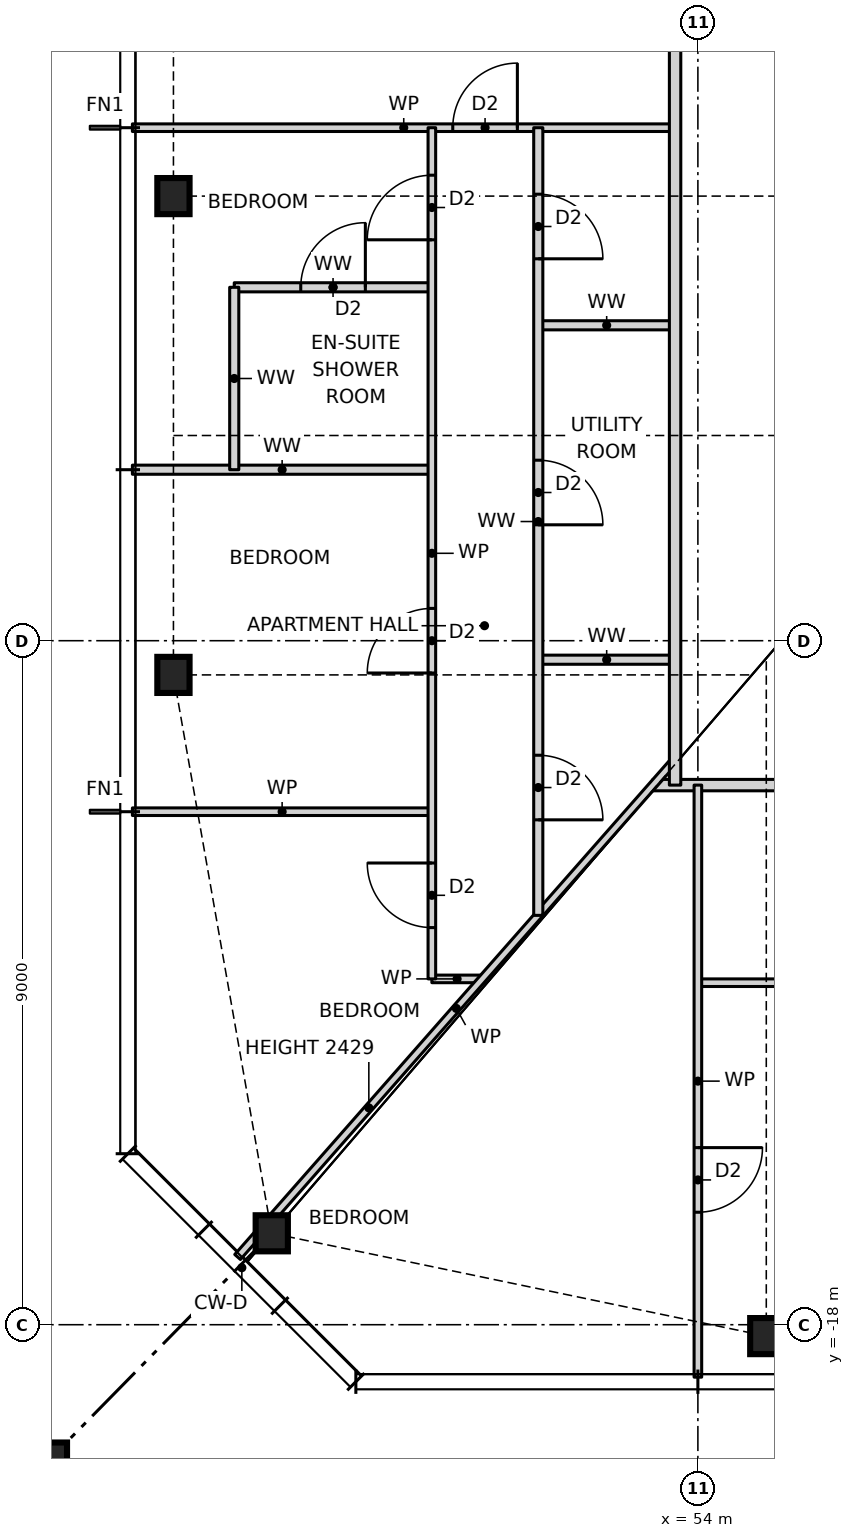
"""IFC4 building model, lengths in metres.
Left out: names, types, materials, properties, quantities, classifications, styles, units other than length and angle.
Written with IfcOpenShell. Run it as: python <this file> out.ifc"""

import sys

from ifc_helpers import new_model, si_unit, direction, frame, frame_2d, origin, origin_2d, place, context, subcontext, project, spatial, rectangle, hollow_rectangle, i_section, extrude, element, fill, save


model = new_model("IFC4")
c1 = context("Model", 3, precision=1e-05, world=origin(), true_north=direction((0.0, 1.0)))
c2 = subcontext(c1, "Body", "Model", "MODEL_VIEW")
j1 = project(units=[si_unit("LENGTHUNIT", "METRE"), si_unit("PLANEANGLEUNIT", "RADIAN")], contexts=[c1])
p1 = place(None, origin())
s1 = spatial("IfcSite", under=j1, at=p1, CompositionType="ELEMENT")
p2 = place(p1, origin())
s2 = spatial("IfcBuilding", under=s1, at=p2, CompositionType="ELEMENT")
p3 = place(p2, frame((0.0, 0.0, 57.0)))
s3 = spatial("IfcBuildingStorey", under=s2, at=p3, CompositionType="ELEMENT", Elevation=57.0)
for number, where, z_axis, x_axis in (
    (1, (48.394, -16.797, 0.0), (0.0, 0.0, 1.0), (1.0, 0.0, 0.0)),
    (2, (54.9, -18.15, 0.0), (0.0, 0.0, 1.0), (1.0, 0.0, 0.0)),
    (3, (47.1, -3.15, 0.0), (0.0, 0.0, 1.0), (1.0, 0.0, 0.0)),
    (4, (47.1, -9.45, 0.0), (0.0, 0.0, 1.0), (1.0, 0.0, 0.0)),
):
    element("IfcColumn", number, at=place(p3, frame(where, z_axis=z_axis, x_axis=x_axis)), inside=s3, PredefinedType="COLUMN", context=c2, shape_type="SweptSolid", body=[
        extrude(i_section(OverallWidth=0.424, OverallDepth=0.475, WebThickness=0.048, FlangeThickness=0.077, at=origin_2d()), origin(), (0.0, 0.0, 1.0), 3.5),
    ])
p4 = place(p3, frame((45.1, -20.15, 0.0), z_axis=(0.0, 0.0, 1.0), x_axis=(1.0, 0.0, 0.0)))
e5 = element("IfcColumn", 5, at=p4, inside=s3, PredefinedType="COLUMN", context=c2, shape_type="SweptSolid", body=[
    extrude(hollow_rectangle(XDim=1.2, YDim=1.2, WallThickness=0.07, at=origin_2d()), origin(), (0.0, 0.0, 1.0), 3.5),
])
p5 = place(p3, frame((54.0, -13.5, 0.0), z_axis=(0.0, 0.0, 1.0), x_axis=(1.0, 0.0, 0.0)))
e6 = element("IfcWall", 6, at=p5, inside=s3, PredefinedType="PARTITIONING", context=c2, shape_type="SweptSolid", body=[
    extrude(rectangle(XDim=9.0, YDim=0.1, at=frame_2d((4.5, 0.0))), origin(), (0.0, 0.0, 1.0), 3.27),
])
p6 = place(p5, frame((1.375, 0.0, 0.0)))
e7 = element("IfcOpeningElement", 7, at=p6, cuts=e6, PredefinedType="OPENING", context=c2, shape_type="SweptSolid", body=[
    extrude(rectangle(XDim=0.85, YDim=2.1, at=frame_2d((0.425, 1.05))), frame((0.0, 0.06, 0.0), z_axis=(0.0, -1.0, 0.0), x_axis=(1.0, 0.0, 0.0)), (0.0, 0.0, 1.0), 0.12),
])
p7 = place(p5, frame((4.575, 0.0, 0.0)))
e8 = element("IfcOpeningElement", 8, at=p7, cuts=e6, PredefinedType="OPENING", context=c2, shape_type="SweptSolid", body=[
    extrude(rectangle(XDim=0.85, YDim=2.1, at=frame_2d((0.425, 1.05))), frame((0.0, 0.06, 0.0), z_axis=(0.0, -1.0, 0.0), x_axis=(1.0, 0.0, 0.0)), (0.0, 0.0, 1.0), 0.12),
])
p8 = place(p3, frame((50.5, -13.45, 0.0), z_axis=(0.0, 0.0, 1.0), x_axis=(1.0, 0.0, 0.0)))
e9 = element("IfcWall", 9, at=p8, inside=s3, PredefinedType="PARTITIONING", context=c2, shape_type="SweptSolid", body=[
    extrude(rectangle(XDim=0.664, YDim=0.1, at=frame_2d((0.332, 0.0))), origin(), (0.0, 0.0, 1.0), 3.27),
])
p9 = place(p3, frame((46.56, -11.25, 0.0), z_axis=(0.0, 0.0, 1.0), x_axis=(1.0, 0.0, 0.0)))
e10 = element("IfcWall", 10, at=p9, inside=s3, PredefinedType="PARTITIONING", context=c2, shape_type="SweptSolid", body=[
    extrude(rectangle(XDim=3.94, YDim=0.1, at=frame_2d((1.97, 0.0))), origin(), (0.0, 0.0, 1.0), 3.27),
])
p10 = place(p3, frame((53.408, -10.9, 0.0), z_axis=(0.0, 0.0, 1.0), x_axis=(1.0, 0.0, 0.0)))
e11 = element("IfcWall", 11, at=p10, inside=s3, PredefinedType="PARTITIONING", context=c2, shape_type="SweptSolid", body=[
    extrude(rectangle(XDim=19.184, YDim=0.15, at=frame_2d((9.592, 0.0))), origin(), (0.0, 0.0, 1.0), 3.27),
])
p11 = place(p10, frame((5.092, 0.0, 0.0)))
e12 = element("IfcOpeningElement", 12, at=p11, cuts=e11, PredefinedType="OPENING", context=c2, shape_type="SweptSolid", body=[
    extrude(rectangle(XDim=1.0, YDim=2.1, at=frame_2d((0.5, 1.05))), frame((0.0, 0.085, 0.0), z_axis=(0.0, -1.0, 0.0), x_axis=(1.0, 0.0, 0.0)), (0.0, 0.0, 1.0), 0.17),
])
p12 = place(p10, frame((10.492, 0.0, 0.0)))
e13 = element("IfcOpeningElement", 13, at=p12, cuts=e11, PredefinedType="OPENING", context=c2, shape_type="SweptSolid", body=[
    extrude(rectangle(XDim=1.0, YDim=2.1, at=frame_2d((0.5, 1.05))), frame((0.0, 0.085, 0.0), z_axis=(0.0, -1.0, 0.0), x_axis=(1.0, 0.0, 0.0)), (0.0, 0.0, 1.0), 0.17),
])
p13 = place(p3, frame((51.9, -9.25, 0.0), z_axis=(0.0, 0.0, 1.0), x_axis=(1.0, 0.0, 0.0)))
e14 = element("IfcWall", 14, at=p13, inside=s3, PredefinedType="PARTITIONING", context=c2, shape_type="SweptSolid", body=[
    extrude(rectangle(XDim=1.8, YDim=0.12, at=frame_2d((0.9, 0.0))), origin(), (0.0, 0.0, 1.0), 3.27),
])
p14 = place(p3, frame((46.56, -6.75, 0.0), z_axis=(0.0, 0.0, 1.0), x_axis=(1.0, 0.0, 0.0)))
e15 = element("IfcWall", 15, at=p14, inside=s3, PredefinedType="PARTITIONING", context=c2, shape_type="SweptSolid", body=[
    extrude(rectangle(XDim=3.94, YDim=0.12, at=frame_2d((1.97, 0.0))), origin(), (0.0, 0.0, 1.0), 3.27),
])
p15 = place(p3, frame((51.9, -4.85, 0.0), z_axis=(0.0, 0.0, 1.0), x_axis=(1.0, 0.0, 0.0)))
e16 = element("IfcWall", 16, at=p15, inside=s3, PredefinedType="PARTITIONING", context=c2, shape_type="SweptSolid", body=[
    extrude(rectangle(XDim=1.8, YDim=0.12, at=frame_2d((0.9, 0.0))), origin(), (0.0, 0.0, 1.0), 3.27),
])
p16 = place(p3, frame((47.9, -4.35, 0.0), z_axis=(0.0, 0.0, 1.0), x_axis=(1.0, 0.0, 0.0)))
e17 = element("IfcWall", 17, at=p16, inside=s3, PredefinedType="PARTITIONING", context=c2, shape_type="SweptSolid", body=[
    extrude(rectangle(XDim=2.6, YDim=0.12, at=frame_2d((1.3, 0.0))), origin(), (0.0, 0.0, 1.0), 3.27),
])
p17 = place(p16, frame((0.875, 0.0, 0.0)))
e18 = element("IfcOpeningElement", 18, at=p17, cuts=e17, PredefinedType="OPENING", context=c2, shape_type="SweptSolid", body=[
    extrude(rectangle(XDim=0.85, YDim=2.1, at=frame_2d((0.425, 1.05))), frame((0.0, 0.07, 0.0), z_axis=(0.0, -1.0, 0.0), x_axis=(1.0, 0.0, 0.0)), (0.0, 0.0, 1.0), 0.14),
])
p18 = place(p3, frame((46.56, -2.25, 0.0), z_axis=(0.0, 0.0, 1.0), x_axis=(1.0, 0.0, 0.0)))
e19 = element("IfcWall", 19, at=p18, inside=s3, PredefinedType="PARTITIONING", context=c2, shape_type="SweptSolid", body=[
    extrude(rectangle(XDim=7.14, YDim=0.1, at=frame_2d((3.57, 0.0))), origin(), (0.0, 0.0, 1.0), 3.27),
])
p19 = place(p18, frame((4.215, 0.0, 0.0)))
e20 = element("IfcOpeningElement", 20, at=p19, cuts=e19, PredefinedType="OPENING", context=c2, shape_type="SweptSolid", body=[
    extrude(rectangle(XDim=0.85, YDim=2.1, at=frame_2d((0.425, 1.05))), frame((0.0, 0.06, 0.0), z_axis=(0.0, -1.0, 0.0), x_axis=(1.0, 0.0, 0.0)), (0.0, 0.0, 1.0), 0.12),
])
p20 = place(p3, frame((47.944, -17.109, 0.0), z_axis=(0.0, 0.0, 1.0), x_axis=(0.660612734851, 0.750726857487, 0.0)))
e21 = element("IfcWall", 21, at=p20, inside=s3, PredefinedType="PARTITIONING", context=c2, shape_type="SweptSolid", body=[
    extrude(rectangle(XDim=8.713, YDim=0.1, at=frame_2d((4.356, 0.0))), origin(), (0.0, 0.0, 1.0), 2.429),
])
p21 = place(p3, frame((54.0, -18.69, 0.0), z_axis=(0.0, 0.0, 1.0), x_axis=(0.0, 1.0, 0.0)))
e22 = element("IfcWall", 22, at=p21, inside=s3, PredefinedType="PARTITIONING", context=c2, shape_type="SweptSolid", body=[
    extrude(rectangle(XDim=7.79, YDim=0.1, at=frame_2d((3.895, 0.0))), origin(), (0.0, 0.0, 1.0), 3.27),
])
p22 = place(p21, frame((2.17, 0.0, 0.0)))
e23 = element("IfcOpeningElement", 23, at=p22, cuts=e22, PredefinedType="OPENING", context=c2, shape_type="SweptSolid", body=[
    extrude(rectangle(XDim=0.85, YDim=2.1, at=frame_2d((0.425, 1.05))), frame((0.0, 0.06, 0.0), z_axis=(0.0, -1.0, 0.0), x_axis=(1.0, 0.0, 0.0)), (0.0, 0.0, 1.0), 0.12),
])
p23 = place(p3, frame((53.7, -10.9, 0.0), z_axis=(0.0, 0.0, 1.0), x_axis=(0.0, 1.0, 0.0)))
e24 = element("IfcWall", 24, at=p23, inside=s3, PredefinedType="PARTITIONING", context=c2, shape_type="SweptSolid", body=[
    extrude(rectangle(XDim=21.468, YDim=0.15, at=frame_2d((10.734, 0.0))), origin(), (0.0, 0.0, 1.0), 3.27),
])
p24 = place(p23, frame((16.65, 0.0, 0.0)))
e25 = element("IfcOpeningElement", 25, at=p24, cuts=e24, PredefinedType="OPENING", context=c2, shape_type="SweptSolid", body=[
    extrude(rectangle(XDim=1.0, YDim=2.1, at=frame_2d((0.5, 1.05))), frame((0.0, 0.085, 0.0), z_axis=(0.0, -1.0, 0.0), x_axis=(1.0, 0.0, 0.0)), (0.0, 0.0, 1.0), 0.17),
])
p25 = place(p23, frame((11.25, 0.0, 0.0)))
e26 = element("IfcOpeningElement", 26, at=p25, cuts=e24, PredefinedType="OPENING", context=c2, shape_type="SweptSolid", body=[
    extrude(rectangle(XDim=1.0, YDim=2.1, at=frame_2d((0.5, 1.05))), frame((0.0, 0.085, 0.0), z_axis=(0.0, -1.0, 0.0), x_axis=(1.0, 0.0, 0.0)), (0.0, 0.0, 1.0), 0.17),
])
p26 = place(p3, frame((51.9, -12.614, 0.0), z_axis=(0.0, 0.0, 1.0), x_axis=(0.0, 1.0, 0.0)))
e27 = element("IfcWall", 27, at=p26, inside=s3, PredefinedType="PARTITIONING", context=c2, shape_type="SweptSolid", body=[
    extrude(rectangle(XDim=10.364, YDim=0.12, at=frame_2d((5.182, 0.0))), origin(), (0.0, 0.0, 1.0), 3.27),
])
p27 = place(p26, frame((8.639, 0.0, 0.0)))
e28 = element("IfcOpeningElement", 28, at=p27, cuts=e27, PredefinedType="OPENING", context=c2, shape_type="SweptSolid", body=[
    extrude(rectangle(XDim=0.85, YDim=2.1, at=frame_2d((0.425, 1.05))), frame((0.0, 0.07, 0.0), z_axis=(0.0, -1.0, 0.0), x_axis=(1.0, 0.0, 0.0)), (0.0, 0.0, 1.0), 0.14),
])
p28 = place(p26, frame((5.139, 0.0, 0.0)))
e29 = element("IfcOpeningElement", 29, at=p28, cuts=e27, PredefinedType="OPENING", context=c2, shape_type="SweptSolid", body=[
    extrude(rectangle(XDim=0.85, YDim=2.1, at=frame_2d((0.425, 1.05))), frame((0.0, 0.07, 0.0), z_axis=(0.0, -1.0, 0.0), x_axis=(1.0, 0.0, 0.0)), (0.0, 0.0, 1.0), 0.14),
])
p29 = place(p26, frame((1.257, 0.0, 0.0)))
e30 = element("IfcOpeningElement", 30, at=p29, cuts=e27, PredefinedType="OPENING", context=c2, shape_type="SweptSolid", body=[
    extrude(rectangle(XDim=0.85, YDim=2.1, at=frame_2d((0.425, 1.05))), frame((0.0, 0.07, 0.0), z_axis=(0.0, -1.0, 0.0), x_axis=(1.0, 0.0, 0.0)), (0.0, 0.0, 1.0), 0.14),
])
p30 = place(p3, frame((50.5, -13.45, 0.0), z_axis=(0.0, 0.0, 1.0), x_axis=(0.0, 1.0, 0.0)))
e31 = element("IfcWall", 31, at=p30, inside=s3, PredefinedType="PARTITIONING", context=c2, shape_type="SweptSolid", body=[
    extrude(rectangle(XDim=11.2, YDim=0.1, at=frame_2d((5.6, 0.0))), origin(), (0.0, 0.0, 1.0), 3.27),
])
p31 = place(p30, frame((9.725, 0.0, 0.0)))
e32 = element("IfcOpeningElement", 32, at=p31, cuts=e31, PredefinedType="OPENING", context=c2, shape_type="SweptSolid", body=[
    extrude(rectangle(XDim=0.85, YDim=2.1, at=frame_2d((0.425, 1.05))), frame((0.0, 0.06, 0.0), z_axis=(0.0, -1.0, 0.0), x_axis=(1.0, 0.0, 0.0)), (0.0, 0.0, 1.0), 0.12),
])
p32 = place(p30, frame((4.025, 0.0, 0.0)))
e33 = element("IfcOpeningElement", 33, at=p32, cuts=e31, PredefinedType="OPENING", context=c2, shape_type="SweptSolid", body=[
    extrude(rectangle(XDim=0.85, YDim=2.1, at=frame_2d((0.425, 1.05))), frame((0.0, 0.06, 0.0), z_axis=(0.0, -1.0, 0.0), x_axis=(1.0, 0.0, 0.0)), (0.0, 0.0, 1.0), 0.12),
])
p33 = place(p30, frame((0.675, 0.0, 0.0)))
e34 = element("IfcOpeningElement", 34, at=p33, cuts=e31, PredefinedType="OPENING", context=c2, shape_type="SweptSolid", body=[
    extrude(rectangle(XDim=0.85, YDim=2.1, at=frame_2d((0.425, 1.05))), frame((0.0, 0.06, 0.0), z_axis=(0.0, -1.0, 0.0), x_axis=(1.0, 0.0, 0.0)), (0.0, 0.0, 1.0), 0.12),
])
p34 = place(p3, frame((47.9, -6.75, 0.0), z_axis=(0.0, 0.0, 1.0), x_axis=(0.0, 1.0, 0.0)))
e35 = element("IfcWall", 35, at=p34, inside=s3, PredefinedType="PARTITIONING", context=c2, shape_type="SweptSolid", body=[
    extrude(rectangle(XDim=2.4, YDim=0.12, at=frame_2d((1.2, 0.0))), origin(), (0.0, 0.0, 1.0), 3.27),
])
p35 = place(p22, frame((0.85, 0.0, 0.0), z_axis=(0.0, 0.0, 1.0), x_axis=(-1.0, 0.0, 0.0)))
e36 = element("IfcDoor", 36, at=p35, inside=s3, OperationType="SINGLE_SWING_LEFT", PredefinedType="DOOR", context=c2, shape_type="SweptSolid", body=[
    extrude(rectangle(XDim=0.85, YDim=2.1, at=frame_2d((0.425, 1.05))), frame((0.0, 0.025, 0.0), z_axis=(0.0, -1.0, 0.0), x_axis=(1.0, 0.0, 0.0)), (0.0, 0.0, 1.0), 0.05),
])
fill(e23, e36)
p36 = place(p19, origin())
e37 = element("IfcDoor", 37, at=p36, inside=s3, OperationType="SINGLE_SWING_RIGHT", PredefinedType="DOOR", context=c2, shape_type="SweptSolid", body=[
    extrude(rectangle(XDim=0.85, YDim=2.1, at=frame_2d((0.425, 1.05))), frame((0.0, 0.025, 0.0), z_axis=(0.0, -1.0, 0.0), x_axis=(1.0, 0.0, 0.0)), (0.0, 0.0, 1.0), 0.05),
])
fill(e20, e37)
p37 = place(p17, origin())
e38 = element("IfcDoor", 38, at=p37, inside=s3, OperationType="SINGLE_SWING_RIGHT", PredefinedType="DOOR", context=c2, shape_type="SweptSolid", body=[
    extrude(rectangle(XDim=0.85, YDim=2.1, at=frame_2d((0.425, 1.05))), frame((0.0, 0.025, 0.0), z_axis=(0.0, -1.0, 0.0), x_axis=(1.0, 0.0, 0.0)), (0.0, 0.0, 1.0), 0.05),
])
fill(e18, e38)
p38 = place(p31, origin())
e39 = element("IfcDoor", 39, at=p38, inside=s3, OperationType="SINGLE_SWING_LEFT", PredefinedType="DOOR", context=c2, shape_type="SweptSolid", body=[
    extrude(rectangle(XDim=0.85, YDim=2.1, at=frame_2d((0.425, 1.05))), frame((0.0, 0.025, 0.0), z_axis=(0.0, -1.0, 0.0), x_axis=(1.0, 0.0, 0.0)), (0.0, 0.0, 1.0), 0.05),
])
fill(e32, e39)
p39 = place(p32, origin())
e40 = element("IfcDoor", 40, at=p39, inside=s3, OperationType="SINGLE_SWING_LEFT", PredefinedType="DOOR", context=c2, shape_type="SweptSolid", body=[
    extrude(rectangle(XDim=0.85, YDim=2.1, at=frame_2d((0.425, 1.05))), frame((0.0, 0.025, 0.0), z_axis=(0.0, -1.0, 0.0), x_axis=(1.0, 0.0, 0.0)), (0.0, 0.0, 1.0), 0.05),
])
fill(e33, e40)
p40 = place(p33, origin())
e41 = element("IfcDoor", 41, at=p40, inside=s3, OperationType="SINGLE_SWING_RIGHT", PredefinedType="DOOR", context=c2, shape_type="SweptSolid", body=[
    extrude(rectangle(XDim=0.85, YDim=2.1, at=frame_2d((0.425, 1.05))), frame((0.0, 0.025, 0.0), z_axis=(0.0, -1.0, 0.0), x_axis=(1.0, 0.0, 0.0)), (0.0, 0.0, 1.0), 0.05),
])
fill(e34, e41)
p41 = place(p27, frame((0.85, 0.0, 0.0), z_axis=(0.0, 0.0, 1.0), x_axis=(-1.0, 0.0, 0.0)))
e42 = element("IfcDoor", 42, at=p41, inside=s3, OperationType="SINGLE_SWING_RIGHT", PredefinedType="DOOR", context=c2, shape_type="SweptSolid", body=[
    extrude(rectangle(XDim=0.85, YDim=2.1, at=frame_2d((0.425, 1.05))), frame((0.0, 0.025, 0.0), z_axis=(0.0, -1.0, 0.0), x_axis=(1.0, 0.0, 0.0)), (0.0, 0.0, 1.0), 0.05),
])
fill(e28, e42)
p42 = place(p28, frame((0.85, 0.0, 0.0), z_axis=(0.0, 0.0, 1.0), x_axis=(-1.0, 0.0, 0.0)))
e43 = element("IfcDoor", 43, at=p42, inside=s3, OperationType="SINGLE_SWING_RIGHT", PredefinedType="DOOR", context=c2, shape_type="SweptSolid", body=[
    extrude(rectangle(XDim=0.85, YDim=2.1, at=frame_2d((0.425, 1.05))), frame((0.0, 0.025, 0.0), z_axis=(0.0, -1.0, 0.0), x_axis=(1.0, 0.0, 0.0)), (0.0, 0.0, 1.0), 0.05),
])
fill(e29, e43)
p43 = place(p29, frame((0.85, 0.0, 0.0), z_axis=(0.0, 0.0, 1.0), x_axis=(-1.0, 0.0, 0.0)))
e44 = element("IfcDoor", 44, at=p43, inside=s3, OperationType="SINGLE_SWING_RIGHT", PredefinedType="DOOR", context=c2, shape_type="SweptSolid", body=[
    extrude(rectangle(XDim=0.85, YDim=2.1, at=frame_2d((0.425, 1.05))), frame((0.0, 0.025, 0.0), z_axis=(0.0, -1.0, 0.0), x_axis=(1.0, 0.0, 0.0)), (0.0, 0.0, 1.0), 0.05),
])
fill(e30, e44)
save(model, sys.argv[1])
